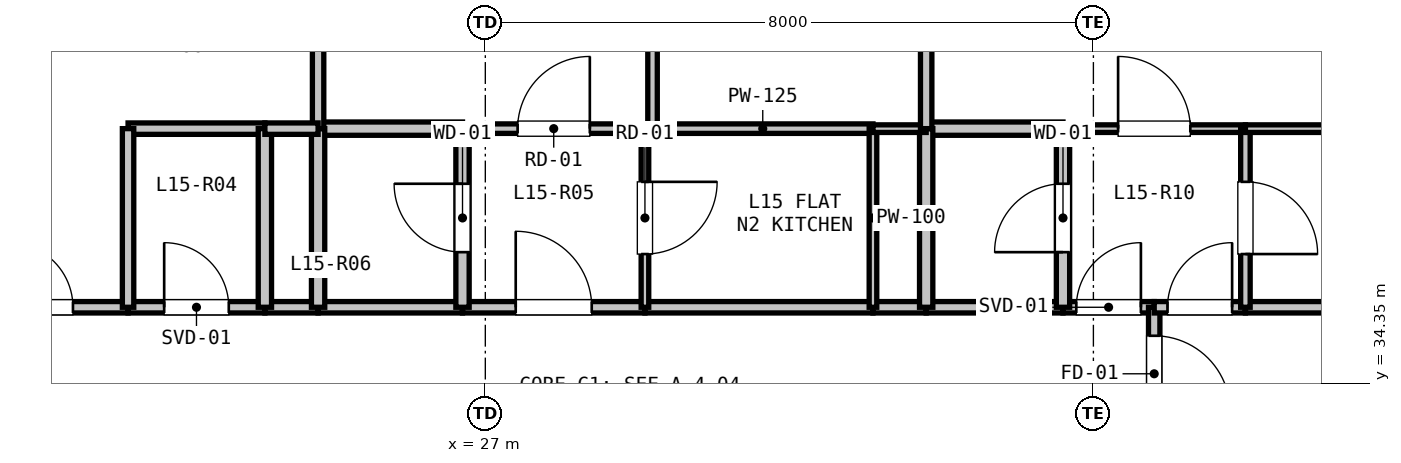
"""IFC4 building model, lengths in metres.
Left out: names, types, materials, properties, quantities, classifications, styles, units other than length and angle.
Written with IfcOpenShell. Run it as: python <this file> out.ifc"""

import sys

from ifc_helpers import new_model, si_unit, direction, frame, frame_2d, origin, place, context, subcontext, project, spatial, rectangle, extrude, element, fill, save


model = new_model("IFC4")
c1 = context("Model", 3, precision=1e-05, world=origin(), true_north=direction((0.0, 1.0)))
c2 = subcontext(c1, "Body", "Model", "MODEL_VIEW")
j1 = project(units=[si_unit("LENGTHUNIT", "METRE"), si_unit("PLANEANGLEUNIT", "RADIAN")], contexts=[c1])
p1 = place(None, origin())
s1 = spatial("IfcSite", under=j1, at=p1, CompositionType="ELEMENT")
p2 = place(p1, origin())
s2 = spatial("IfcBuilding", under=s1, at=p2, CompositionType="ELEMENT")
p3 = place(p2, frame((0.0, 0.0, 55.5)))
s3 = spatial("IfcBuildingStorey", under=s2, at=p3, CompositionType="ELEMENT", Elevation=55.5)
p4 = place(p3, frame((16.39, 36.617, 0.0), z_axis=(0.0, 0.0, 1.0), x_axis=(0.866027351828, 0.499996625875, 0.0)))
e1 = element("IfcWall", 1, at=p4, inside=s3, PredefinedType="PARAPET", context=c2, shape_type="SweptSolid", body=[
    extrude(rectangle(XDim=11.973, YDim=0.2, at=frame_2d((5.987, 0.0))), origin(), (0.0, 0.0, 1.0), 0.2),
])
p5 = place(p3, frame((20.0, 35.35, 0.0), z_axis=(0.0, 0.0, 1.0), x_axis=(1.0, 0.0, 0.0)))
e2 = element("IfcWall", 2, at=p5, inside=s3, PredefinedType="PARTITIONING", context=c2, shape_type="SweptSolid", body=[
    extrude(rectangle(XDim=2.3, YDim=0.15, at=frame_2d((1.15, 0.0))), origin(), (0.0, 0.0, 1.0), 3.04),
])
p6 = place(p5, frame((0.725, 0.0, 0.0)))
e3 = element("IfcOpeningElement", 3, at=p6, cuts=e2, PredefinedType="OPENING", context=c2, shape_type="SweptSolid", body=[
    extrude(rectangle(XDim=0.85, YDim=2.1, at=frame_2d((0.425, 1.05))), frame((0.0, 0.085, 0.0), z_axis=(0.0, -1.0, 0.0), x_axis=(1.0, 0.0, 0.0)), (0.0, 0.0, 1.0), 0.17),
])
p7 = place(p3, frame((22.3, 35.35, 0.0), z_axis=(0.0, 0.0, 1.0), x_axis=(1.0, 0.0, 0.0)))
e4 = element("IfcWall", 4, at=p7, inside=s3, PredefinedType="PARTITIONING", context=c2, shape_type="SweptSolid", body=[
    extrude(rectangle(XDim=1.8, YDim=0.15, at=frame_2d((0.9, 0.0))), origin(), (0.0, 0.0, 1.0), 3.04),
])
p8 = place(p7, frame((0.475, 0.0, 0.0)))
e5 = element("IfcOpeningElement", 5, at=p8, cuts=e4, PredefinedType="OPENING", context=c2, shape_type="SweptSolid", body=[
    extrude(rectangle(XDim=0.85, YDim=2.1, at=frame_2d((0.425, 1.05))), frame((0.0, 0.085, 0.0), z_axis=(0.0, -1.0, 0.0), x_axis=(1.0, 0.0, 0.0)), (0.0, 0.0, 1.0), 0.17),
])
p9 = place(p3, frame((24.1, 35.35, 0.0), z_axis=(0.0, 0.0, 1.0), x_axis=(1.0, 0.0, 0.0)))
e6 = element("IfcWall", 6, at=p9, inside=s3, PredefinedType="PARTITIONING", context=c2, shape_type="SweptSolid", body=[
    extrude(rectangle(XDim=0.7, YDim=0.15, at=frame_2d((0.35, 0.0))), origin(), (0.0, 0.0, 1.0), 3.04),
])
p10 = place(p3, frame((24.8, 35.35, 0.0), z_axis=(0.0, 0.0, 1.0), x_axis=(1.0, 0.0, 0.0)))
e7 = element("IfcWall", 7, at=p10, inside=s3, PredefinedType="PARTITIONING", context=c2, shape_type="SweptSolid", body=[
    extrude(rectangle(XDim=1.9, YDim=0.15, at=frame_2d((0.95, 0.0))), origin(), (0.0, 0.0, 1.0), 3.04),
])
p11 = place(p3, frame((26.7, 35.35, 0.0), z_axis=(0.0, 0.0, 1.0), x_axis=(1.0, 0.0, 0.0)))
e8 = element("IfcWall", 8, at=p11, inside=s3, PredefinedType="PARTITIONING", context=c2, shape_type="SweptSolid", body=[
    extrude(rectangle(XDim=2.4, YDim=0.15, at=frame_2d((1.2, 0.0))), origin(), (0.0, 0.0, 1.0), 3.04),
])
p12 = place(p11, frame((0.7, 0.0, 0.0)))
e9 = element("IfcOpeningElement", 9, at=p12, cuts=e8, PredefinedType="OPENING", context=c2, shape_type="SweptSolid", body=[
    extrude(rectangle(XDim=1.0, YDim=2.15, at=frame_2d((0.5, 1.075))), frame((0.0, 0.085, 0.0), z_axis=(0.0, -1.0, 0.0), x_axis=(1.0, 0.0, 0.0)), (0.0, 0.0, 1.0), 0.17),
])
p13 = place(p3, frame((29.1, 35.35, 0.0), z_axis=(0.0, 0.0, 1.0), x_axis=(1.0, 0.0, 0.0)))
e10 = element("IfcWall", 10, at=p13, inside=s3, PredefinedType="PARTITIONING", context=c2, shape_type="SweptSolid", body=[
    extrude(rectangle(XDim=3.0, YDim=0.15, at=frame_2d((1.5, 0.0))), origin(), (0.0, 0.0, 1.0), 3.04),
])
p14 = place(p3, frame((32.1, 35.35, 0.0), z_axis=(0.0, 0.0, 1.0), x_axis=(1.0, 0.0, 0.0)))
e11 = element("IfcWall", 11, at=p14, inside=s3, PredefinedType="PARTITIONING", context=c2, shape_type="SweptSolid", body=[
    extrude(rectangle(XDim=0.7, YDim=0.15, at=frame_2d((0.35, 0.0))), origin(), (0.0, 0.0, 1.0), 3.04),
])
p15 = place(p3, frame((32.8, 35.35, 0.0), z_axis=(0.0, 0.0, 1.0), x_axis=(1.0, 0.0, 0.0)))
e12 = element("IfcWall", 12, at=p15, inside=s3, PredefinedType="PARTITIONING", context=c2, shape_type="SweptSolid", body=[
    extrude(rectangle(XDim=1.8, YDim=0.15, at=frame_2d((0.9, 0.0))), origin(), (0.0, 0.0, 1.0), 3.04),
])
p16 = place(p3, frame((34.6, 35.35, 0.0), z_axis=(0.0, 0.0, 1.0), x_axis=(1.0, 0.0, 0.0)))
e13 = element("IfcWall", 13, at=p16, inside=s3, PredefinedType="PARTITIONING", context=c2, shape_type="SweptSolid", body=[
    extrude(rectangle(XDim=1.2, YDim=0.15, at=frame_2d((0.6, 0.0))), origin(), (0.0, 0.0, 1.0), 3.04),
])
p17 = place(p16, frame((0.175, 0.0, 0.0)))
e14 = element("IfcOpeningElement", 14, at=p17, cuts=e13, PredefinedType="OPENING", context=c2, shape_type="SweptSolid", body=[
    extrude(rectangle(XDim=0.85, YDim=2.1, at=frame_2d((0.425, 1.05))), frame((0.0, 0.085, 0.0), z_axis=(0.0, -1.0, 0.0), x_axis=(1.0, 0.0, 0.0)), (0.0, 0.0, 1.0), 0.17),
])
p18 = place(p3, frame((35.8, 35.35, 0.0), z_axis=(0.0, 0.0, 1.0), x_axis=(0.0, -1.0, 0.0)))
e15 = element("IfcWall", 15, at=p18, inside=s3, PredefinedType="PARTITIONING", context=c2, shape_type="SweptSolid", body=[
    extrude(rectangle(XDim=1.75, YDim=0.15, at=frame_2d((0.875, 0.0))), origin(), (0.0, 0.0, 1.0), 3.04),
])
p19 = place(p18, frame((0.375, 0.0, 0.0)))
e16 = element("IfcOpeningElement", 16, at=p19, cuts=e15, PredefinedType="OPENING", context=c2, shape_type="SweptSolid", body=[
    extrude(rectangle(XDim=1.0, YDim=2.15, at=frame_2d((0.5, 1.075))), frame((0.0, 0.085, 0.0), z_axis=(0.0, -1.0, 0.0), x_axis=(1.0, 0.0, 0.0)), (0.0, 0.0, 1.0), 0.17),
])
p20 = place(p3, frame((35.8, 35.35, 0.0), z_axis=(0.0, 0.0, 1.0), x_axis=(1.0, 0.0, 0.0)))
e17 = element("IfcWall", 17, at=p20, inside=s3, PredefinedType="PARTITIONING", context=c2, shape_type="SweptSolid", body=[
    extrude(rectangle(XDim=1.2, YDim=0.15, at=frame_2d((0.6, 0.0))), origin(), (0.0, 0.0, 1.0), 2.337),
])
p21 = place(p20, frame((0.175, 0.0, 0.0)))
e18 = element("IfcOpeningElement", 18, at=p21, cuts=e17, PredefinedType="OPENING", context=c2, shape_type="SweptSolid", body=[
    extrude(rectangle(XDim=0.85, YDim=2.1, at=frame_2d((0.425, 1.05))), frame((0.0, 0.085, 0.0), z_axis=(0.0, -1.0, 0.0), x_axis=(1.0, 0.0, 0.0)), (0.0, 0.0, 1.0), 0.17),
])
p22 = place(p3, frame((37.0, 35.35, 0.0), z_axis=(0.0, 0.0, 1.0), x_axis=(1.0, 0.0, 0.0)))
e19 = element("IfcWall", 19, at=p22, inside=s3, PredefinedType="PARTITIONING", context=c2, shape_type="SweptSolid", body=[
    extrude(rectangle(XDim=1.4, YDim=0.15, at=frame_2d((0.7, 0.0))), origin(), (0.0, 0.0, 1.0), 2.337),
])
p23 = place(p3, frame((26.7, 37.7, 0.0), z_axis=(0.0, 0.0, 1.0), x_axis=(1.0, 0.0, 0.0)))
e20 = element("IfcWall", 20, at=p23, inside=s3, PredefinedType="PARTITIONING", context=c2, shape_type="SweptSolid", body=[
    extrude(rectangle(XDim=2.4, YDim=0.125, at=frame_2d((1.2, 0.0))), origin(), (0.0, 0.0, 1.0), 3.04),
])
p24 = place(p23, frame((0.725, 0.0, 0.0)))
e21 = element("IfcOpeningElement", 21, at=p24, cuts=e20, PredefinedType="OPENING", context=c2, shape_type="SweptSolid", body=[
    extrude(rectangle(XDim=0.95, YDim=2.1, at=frame_2d((0.475, 1.05))), frame((0.0, 0.073, 0.0), z_axis=(0.0, -1.0, 0.0), x_axis=(1.0, 0.0, 0.0)), (0.0, 0.0, 1.0), 0.145),
])
p25 = place(p3, frame((29.1, 37.7, 0.0), z_axis=(0.0, 0.0, 1.0), x_axis=(0.0, -1.0, 0.0)))
e22 = element("IfcWall", 22, at=p25, inside=s3, PredefinedType="PARTITIONING", context=c2, shape_type="SweptSolid", body=[
    extrude(rectangle(XDim=2.35, YDim=0.1, at=frame_2d((1.175, 0.0))), origin(), (0.0, 0.0, 1.0), 3.04),
])
p26 = place(p25, frame((0.7, 0.0, 0.0)))
e23 = element("IfcOpeningElement", 23, at=p26, cuts=e22, PredefinedType="OPENING", context=c2, shape_type="SweptSolid", body=[
    extrude(rectangle(XDim=0.95, YDim=2.1, at=frame_2d((0.475, 1.05))), frame((0.0, 0.06, 0.0), z_axis=(0.0, -1.0, 0.0), x_axis=(1.0, 0.0, 0.0)), (0.0, 0.0, 1.0), 0.12),
])
p27 = place(p3, frame((26.7, 35.35, 0.0), z_axis=(0.0, 0.0, 1.0), x_axis=(0.0, 1.0, 0.0)))
e24 = element("IfcWall", 24, at=p27, inside=s3, PredefinedType="PLUMBINGWALL", context=c2, shape_type="SweptSolid", body=[
    extrude(rectangle(XDim=2.35, YDim=0.175, at=frame_2d((1.175, 0.0))), origin(), (0.0, 0.0, 1.0), 3.04),
])
p28 = place(p27, frame((0.725, 0.0, 0.0)))
e25 = element("IfcOpeningElement", 25, at=p28, cuts=e24, PredefinedType="OPENING", context=c2, shape_type="SweptSolid", body=[
    extrude(rectangle(XDim=0.9, YDim=2.1, at=frame_2d((0.45, 1.05))), frame((0.0, 0.097, 0.0), z_axis=(0.0, -1.0, 0.0), x_axis=(1.0, 0.0, 0.0)), (0.0, 0.0, 1.0), 0.195),
])
p29 = place(p3, frame((34.6, 37.7, 0.0), z_axis=(0.0, 0.0, 1.0), x_axis=(1.0, 0.0, 0.0)))
e26 = element("IfcWall", 26, at=p29, inside=s3, PredefinedType="PARTITIONING", context=c2, shape_type="SweptSolid", body=[
    extrude(rectangle(XDim=2.4, YDim=0.1, at=frame_2d((1.2, 0.0))), origin(), (0.0, 0.0, 1.0), 2.337),
])
p30 = place(p29, frame((0.725, 0.0, 0.0)))
e27 = element("IfcOpeningElement", 27, at=p30, cuts=e26, PredefinedType="OPENING", context=c2, shape_type="SweptSolid", body=[
    extrude(rectangle(XDim=0.95, YDim=2.1, at=frame_2d((0.475, 1.05))), frame((0.0, 0.06, 0.0), z_axis=(0.0, -1.0, 0.0), x_axis=(1.0, 0.0, 0.0)), (0.0, 0.0, 1.0), 0.12),
])
p31 = place(p3, frame((37.0, 37.7, 0.0), z_axis=(0.0, 0.0, 1.0), x_axis=(0.0, -1.0, 0.0)))
e28 = element("IfcWall", 28, at=p31, inside=s3, PredefinedType="PARTITIONING", context=c2, shape_type="SweptSolid", body=[
    extrude(rectangle(XDim=2.35, YDim=0.125, at=frame_2d((1.175, 0.0))), origin(), (0.0, 0.0, 1.0), 2.337),
])
p32 = place(p31, frame((0.7, 0.0, 0.0)))
e29 = element("IfcOpeningElement", 29, at=p32, cuts=e28, PredefinedType="OPENING", context=c2, shape_type="SweptSolid", body=[
    extrude(rectangle(XDim=0.95, YDim=2.1, at=frame_2d((0.475, 1.05))), frame((0.0, 0.073, 0.0), z_axis=(0.0, -1.0, 0.0), x_axis=(1.0, 0.0, 0.0)), (0.0, 0.0, 1.0), 0.145),
])
p33 = place(p3, frame((34.6, 35.35, 0.0), z_axis=(0.0, 0.0, 1.0), x_axis=(0.0, 1.0, 0.0)))
e30 = element("IfcWall", 30, at=p33, inside=s3, PredefinedType="PLUMBINGWALL", context=c2, shape_type="SweptSolid", body=[
    extrude(rectangle(XDim=2.35, YDim=0.175, at=frame_2d((1.175, 0.0))), origin(), (0.0, 0.0, 1.0), 3.04),
])
p34 = place(p33, frame((0.725, 0.0, 0.0)))
e31 = element("IfcOpeningElement", 31, at=p34, cuts=e30, PredefinedType="OPENING", context=c2, shape_type="SweptSolid", body=[
    extrude(rectangle(XDim=0.9, YDim=2.1, at=frame_2d((0.45, 1.05))), frame((0.0, 0.097, 0.0), z_axis=(0.0, -1.0, 0.0), x_axis=(1.0, 0.0, 0.0)), (0.0, 0.0, 1.0), 0.195),
])
p35 = place(p3, frame((22.3, 37.7, 0.0), z_axis=(0.0, 0.0, 1.0), x_axis=(1.0, 0.0, 0.0)))
e32 = element("IfcWall", 32, at=p35, inside=s3, PredefinedType="PARTITIONING", context=c2, shape_type="SweptSolid", body=[
    extrude(rectangle(XDim=1.8, YDim=0.15, at=frame_2d((0.9, 0.0))), origin(), (0.0, 0.0, 1.0), 3.04),
])
p36 = place(p3, frame((24.1, 37.7, 0.0), z_axis=(0.0, 0.0, 1.0), x_axis=(0.0, -1.0, 0.0)))
e33 = element("IfcWall", 33, at=p36, inside=s3, PredefinedType="PLUMBINGWALL", context=c2, shape_type="SweptSolid", body=[
    extrude(rectangle(XDim=2.35, YDim=0.175, at=frame_2d((1.175, 0.0))), origin(), (0.0, 0.0, 1.0), 3.04),
])
p37 = place(p3, frame((22.3, 35.35, 0.0), z_axis=(0.0, 0.0, 1.0), x_axis=(0.0, 1.0, 0.0)))
e34 = element("IfcWall", 34, at=p37, inside=s3, PredefinedType="PARTITIONING", context=c2, shape_type="SweptSolid", body=[
    extrude(rectangle(XDim=2.35, YDim=0.15, at=frame_2d((1.175, 0.0))), origin(), (0.0, 0.0, 1.0), 3.04),
])
p38 = place(p3, frame((24.8, 37.7, 0.0), z_axis=(0.0, 0.0, 1.0), x_axis=(1.0, 0.0, 0.0)))
e35 = element("IfcWall", 35, at=p38, inside=s3, PredefinedType="PLUMBINGWALL", context=c2, shape_type="SweptSolid", body=[
    extrude(rectangle(XDim=1.9, YDim=0.175, at=frame_2d((0.95, 0.0))), origin(), (0.0, 0.0, 1.0), 3.04),
])
p39 = place(p3, frame((24.8, 35.35, 0.0), z_axis=(0.0, 0.0, 1.0), x_axis=(0.0, 1.0, 0.0)))
e36 = element("IfcWall", 36, at=p39, inside=s3, PredefinedType="PLUMBINGWALL", context=c2, shape_type="SweptSolid", body=[
    extrude(rectangle(XDim=2.35, YDim=0.175, at=frame_2d((1.175, 0.0))), origin(), (0.0, 0.0, 1.0), 3.04),
])
p40 = place(p3, frame((29.2, 37.7, 0.0), z_axis=(0.0, 0.0, 1.0), x_axis=(1.0, 0.0, 0.0)))
e37 = element("IfcWall", 37, at=p40, inside=s3, PredefinedType="PARTITIONING", context=c2, shape_type="SweptSolid", body=[
    extrude(rectangle(XDim=2.9, YDim=0.125, at=frame_2d((1.45, 0.0))), origin(), (0.0, 0.0, 1.0), 3.04),
])
p41 = place(p3, frame((32.1, 37.7, 0.0), z_axis=(0.0, 0.0, 1.0), x_axis=(0.0, -1.0, 0.0)))
e38 = element("IfcWall", 38, at=p41, inside=s3, PredefinedType="PARTITIONING", context=c2, shape_type="SweptSolid", body=[
    extrude(rectangle(XDim=2.35, YDim=0.1, at=frame_2d((1.175, 0.0))), origin(), (0.0, 0.0, 1.0), 3.04),
])
p42 = place(p3, frame((32.8, 37.7, 0.0), z_axis=(0.0, 0.0, 1.0), x_axis=(1.0, 0.0, 0.0)))
e39 = element("IfcWall", 39, at=p42, inside=s3, PredefinedType="PLUMBINGWALL", context=c2, shape_type="SweptSolid", body=[
    extrude(rectangle(XDim=1.8, YDim=0.175, at=frame_2d((0.9, 0.0))), origin(), (0.0, 0.0, 1.0), 3.04),
])
p43 = place(p3, frame((32.8, 35.35, 0.0), z_axis=(0.0, 0.0, 1.0), x_axis=(0.0, 1.0, 0.0)))
e40 = element("IfcWall", 40, at=p43, inside=s3, PredefinedType="PLUMBINGWALL", context=c2, shape_type="SweptSolid", body=[
    extrude(rectangle(XDim=2.35, YDim=0.175, at=frame_2d((1.175, 0.0))), origin(), (0.0, 0.0, 1.0), 3.04),
])
p44 = place(p3, frame((37.0, 37.7, 0.0), z_axis=(0.0, 0.0, 1.0), x_axis=(1.0, 0.0, 0.0)))
e41 = element("IfcWall", 41, at=p44, inside=s3, PredefinedType="PARTITIONING", context=c2, shape_type="SweptSolid", body=[
    extrude(rectangle(XDim=6.688, YDim=0.1, at=frame_2d((3.344, 0.0))), origin(), (0.0, 0.0, 1.0), 2.337),
])
p45 = place(p44, frame((2.869, 0.0, 0.0)))
e42 = element("IfcOpeningElement", 42, at=p45, cuts=e41, PredefinedType="OPENING", context=c2, shape_type="SweptSolid", body=[
    extrude(rectangle(XDim=0.95, YDim=2.1, at=frame_2d((0.475, 1.05))), frame((0.0, 0.06, 0.0), z_axis=(0.0, -1.0, 0.0), x_axis=(1.0, 0.0, 0.0)), (0.0, 0.0, 1.0), 0.12),
])
p46 = place(p3, frame((24.8, 41.431, 0.0), z_axis=(0.0, 0.0, 1.0), x_axis=(0.0, -1.0, 0.0)))
e43 = element("IfcWall", 43, at=p46, inside=s3, PredefinedType="PARTITIONING", context=c2, shape_type="SweptSolid", body=[
    extrude(rectangle(XDim=3.731, YDim=0.15, at=frame_2d((1.865, 0.0))), origin(), (0.0, 0.0, 1.0), 2.365),
])
p47 = place(p3, frame((24.8, 37.7, 0.0), z_axis=(0.0, 0.0, 1.0), x_axis=(-1.0, 0.0, 0.0)))
e44 = element("IfcWall", 44, at=p47, inside=s3, PredefinedType="PARTITIONING", context=c2, shape_type="SweptSolid", body=[
    extrude(rectangle(XDim=0.7, YDim=0.15, at=frame_2d((0.35, 0.0))), origin(), (0.0, 0.0, 1.0), 3.04),
])
p48 = place(p3, frame((29.2, 43.826, 0.0), z_axis=(0.0, 0.0, 1.0), x_axis=(0.0, -1.0, 0.0)))
e45 = element("IfcWall", 45, at=p48, inside=s3, PredefinedType="PARTITIONING", context=c2, shape_type="SweptSolid", body=[
    extrude(rectangle(XDim=6.126, YDim=0.125, at=frame_2d((3.063, 0.0))), origin(), (0.0, 0.0, 1.0), 2.365),
])
p49 = place(p48, frame((2.588, 0.0, 0.0)))
e46 = element("IfcOpeningElement", 46, at=p49, cuts=e45, PredefinedType="OPENING", context=c2, shape_type="SweptSolid", body=[
    extrude(rectangle(XDim=0.95, YDim=2.1, at=frame_2d((0.475, 1.05))), frame((0.0, 0.073, 0.0), z_axis=(0.0, -1.0, 0.0), x_axis=(1.0, 0.0, 0.0)), (0.0, 0.0, 1.0), 0.145),
])
p50 = place(p3, frame((32.8, 37.7, 0.0), z_axis=(0.0, 0.0, 1.0), x_axis=(-1.0, 0.0, 0.0)))
e47 = element("IfcWall", 47, at=p50, inside=s3, PredefinedType="PARTITIONING", context=c2, shape_type="SweptSolid", body=[
    extrude(rectangle(XDim=0.7, YDim=0.1, at=frame_2d((0.35, 0.0))), origin(), (0.0, 0.0, 1.0), 3.04),
])
p51 = place(p3, frame((32.8, 45.905, 0.0), z_axis=(0.0, 0.0, 1.0), x_axis=(0.0, -1.0, 0.0)))
e48 = element("IfcWall", 48, at=p51, inside=s3, PredefinedType="PARTITIONING", context=c2, shape_type="SweptSolid", body=[
    extrude(rectangle(XDim=8.205, YDim=0.15, at=frame_2d((4.103, 0.0))), origin(), (0.0, 0.0, 1.0), 2.365),
])
p52 = place(p19, origin())
e49 = element("IfcDoor", 49, at=p52, inside=s3, OperationType="SINGLE_SWING_RIGHT", PredefinedType="DOOR", context=c2, shape_type="SweptSolid", body=[
    extrude(rectangle(XDim=1.0, YDim=2.15, at=frame_2d((0.5, 1.075))), frame((0.0, 0.025, 0.0), z_axis=(0.0, -1.0, 0.0), x_axis=(1.0, 0.0, 0.0)), (0.0, 0.0, 1.0), 0.05),
])
fill(e16, e49)
p53 = place(p12, origin())
e50 = element("IfcDoor", 50, at=p53, inside=s3, OperationType="SINGLE_SWING_LEFT", PredefinedType="DOOR", context=c2, shape_type="SweptSolid", body=[
    extrude(rectangle(XDim=1.0, YDim=2.15, at=frame_2d((0.5, 1.075))), frame((0.0, 0.025, 0.0), z_axis=(0.0, -1.0, 0.0), x_axis=(1.0, 0.0, 0.0)), (0.0, 0.0, 1.0), 0.05),
])
fill(e9, e50)
p54 = place(p17, origin())
e51 = element("IfcDoor", 51, at=p54, inside=s3, OperationType="SINGLE_SWING_RIGHT", PredefinedType="DOOR", context=c2, shape_type="SweptSolid", body=[
    extrude(rectangle(XDim=0.85, YDim=2.1, at=frame_2d((0.425, 1.05))), frame((0.0, 0.025, 0.0), z_axis=(0.0, -1.0, 0.0), x_axis=(1.0, 0.0, 0.0)), (0.0, 0.0, 1.0), 0.05),
])
fill(e14, e51)
p55 = place(p8, origin())
e52 = element("IfcDoor", 52, at=p55, inside=s3, OperationType="SINGLE_SWING_LEFT", PredefinedType="DOOR", context=c2, shape_type="SweptSolid", body=[
    extrude(rectangle(XDim=0.85, YDim=2.1, at=frame_2d((0.425, 1.05))), frame((0.0, 0.025, 0.0), z_axis=(0.0, -1.0, 0.0), x_axis=(1.0, 0.0, 0.0)), (0.0, 0.0, 1.0), 0.05),
])
fill(e5, e52)
p56 = place(p6, origin())
e53 = element("IfcDoor", 53, at=p56, inside=s3, OperationType="SINGLE_SWING_LEFT", PredefinedType="DOOR", context=c2, shape_type="SweptSolid", body=[
    extrude(rectangle(XDim=0.85, YDim=2.1, at=frame_2d((0.425, 1.05))), frame((0.0, 0.025, 0.0), z_axis=(0.0, -1.0, 0.0), x_axis=(1.0, 0.0, 0.0)), (0.0, 0.0, 1.0), 0.05),
])
fill(e3, e53)
p57 = place(p21, origin())
e54 = element("IfcDoor", 54, at=p57, inside=s3, OperationType="SINGLE_SWING_RIGHT", PredefinedType="DOOR", context=c2, shape_type="SweptSolid", body=[
    extrude(rectangle(XDim=0.85, YDim=2.1, at=frame_2d((0.425, 1.05))), frame((0.0, 0.025, 0.0), z_axis=(0.0, -1.0, 0.0), x_axis=(1.0, 0.0, 0.0)), (0.0, 0.0, 1.0), 0.05),
])
fill(e18, e54)
p58 = place(p28, origin())
e55 = element("IfcDoor", 55, at=p58, inside=s3, OperationType="SINGLE_SWING_RIGHT", PredefinedType="DOOR", context=c2, shape_type="SweptSolid", body=[
    extrude(rectangle(XDim=0.9, YDim=2.1, at=frame_2d((0.45, 1.05))), frame((0.0, 0.025, 0.0), z_axis=(0.0, -1.0, 0.0), x_axis=(1.0, 0.0, 0.0)), (0.0, 0.0, 1.0), 0.05),
])
fill(e25, e55)
p59 = place(p26, origin())
e56 = element("IfcDoor", 56, at=p59, inside=s3, OperationType="SINGLE_SWING_LEFT", PredefinedType="DOOR", context=c2, shape_type="SweptSolid", body=[
    extrude(rectangle(XDim=0.95, YDim=2.1, at=frame_2d((0.475, 1.05))), frame((0.0, 0.025, 0.0), z_axis=(0.0, -1.0, 0.0), x_axis=(1.0, 0.0, 0.0)), (0.0, 0.0, 1.0), 0.05),
])
fill(e23, e56)
p60 = place(p24, origin())
e57 = element("IfcDoor", 57, at=p60, inside=s3, OperationType="SINGLE_SWING_RIGHT", PredefinedType="DOOR", context=c2, shape_type="SweptSolid", body=[
    extrude(rectangle(XDim=0.95, YDim=2.1, at=frame_2d((0.475, 1.05))), frame((0.0, 0.025, 0.0), z_axis=(0.0, -1.0, 0.0), x_axis=(1.0, 0.0, 0.0)), (0.0, 0.0, 1.0), 0.05),
])
fill(e21, e57)
p61 = place(p34, origin())
e58 = element("IfcDoor", 58, at=p61, inside=s3, OperationType="SINGLE_SWING_LEFT", PredefinedType="DOOR", context=c2, shape_type="SweptSolid", body=[
    extrude(rectangle(XDim=0.9, YDim=2.1, at=frame_2d((0.45, 1.05))), frame((0.0, 0.025, 0.0), z_axis=(0.0, -1.0, 0.0), x_axis=(1.0, 0.0, 0.0)), (0.0, 0.0, 1.0), 0.05),
])
fill(e31, e58)
p62 = place(p32, origin())
e59 = element("IfcDoor", 59, at=p62, inside=s3, OperationType="SINGLE_SWING_RIGHT", PredefinedType="DOOR", context=c2, shape_type="SweptSolid", body=[
    extrude(rectangle(XDim=0.95, YDim=2.1, at=frame_2d((0.475, 1.05))), frame((0.0, 0.025, 0.0), z_axis=(0.0, -1.0, 0.0), x_axis=(1.0, 0.0, 0.0)), (0.0, 0.0, 1.0), 0.05),
])
fill(e29, e59)
p63 = place(p30, origin())
e60 = element("IfcDoor", 60, at=p63, inside=s3, OperationType="SINGLE_SWING_LEFT", PredefinedType="DOOR", context=c2, shape_type="SweptSolid", body=[
    extrude(rectangle(XDim=0.95, YDim=2.1, at=frame_2d((0.475, 1.05))), frame((0.0, 0.025, 0.0), z_axis=(0.0, -1.0, 0.0), x_axis=(1.0, 0.0, 0.0)), (0.0, 0.0, 1.0), 0.05),
])
fill(e27, e60)
save(model, sys.argv[1])
